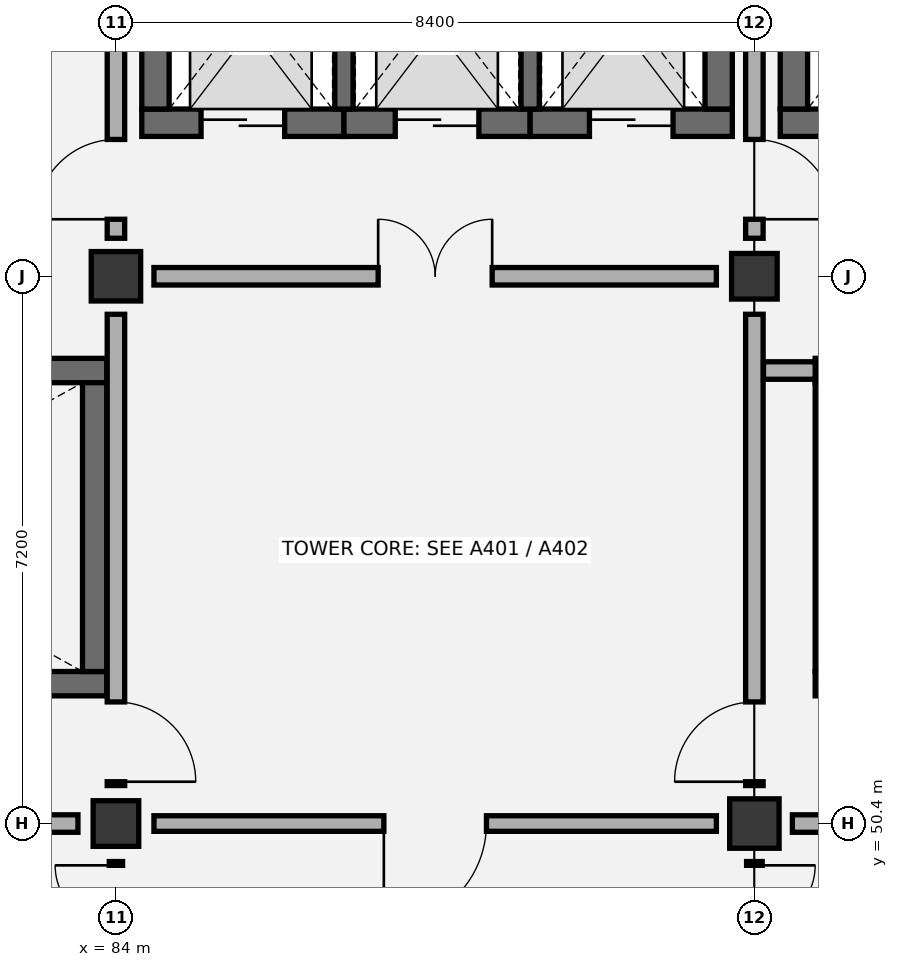
"""IFC4 building model, lengths in metres.
Left out: names, types, materials, properties, quantities, classifications, styles, units other than length and angle.
Written with IfcOpenShell. Run it as: python <this file> out.ifc"""

import sys

from ifc_helpers import new_model, si_unit, direction, frame, frame_2d, origin, origin_2d, place, context, subcontext, project, spatial, rectangle, extrude, element, fill, save


model = new_model("IFC4")
c1 = context("Model", 3, precision=1e-05, world=origin(), true_north=direction((0.0, 1.0)))
c2 = subcontext(c1, "Body", "Model", "MODEL_VIEW")
j1 = project(units=[si_unit("LENGTHUNIT", "METRE"), si_unit("PLANEANGLEUNIT", "RADIAN")], contexts=[c1])
p1 = place(None, origin())
s1 = spatial("IfcSite", under=j1, at=p1, CompositionType="ELEMENT")
p2 = place(p1, origin())
s2 = spatial("IfcBuilding", under=s1, at=p2, CompositionType="ELEMENT")
p3 = place(p2, frame((0.0, 0.0, 56.4)))
s3 = spatial("IfcBuildingStorey", under=s2, at=p3, CompositionType="ELEMENT", Elevation=56.4)
p4 = place(p3, frame((84.0, 50.4, 0.0), z_axis=(0.0, 0.0, 1.0), x_axis=(1.0, 0.0, 0.0)))
e1 = element("IfcColumn", 1, at=p4, inside=s3, PredefinedType="COLUMN", context=c2, shape_type="SweptSolid", body=[
    extrude(rectangle(XDim=0.6, YDim=0.6, at=origin_2d()), origin(), (0.0, 0.0, 1.0), 4.2),
])
for number, where, z_axis, x_axis in (
    (2, (84.0, 57.6, 0.0), (0.0, 0.0, 1.0), (1.0, 0.0, 0.0)),
    (3, (92.4, 50.4, 0.0), (0.0, 0.0, 1.0), (1.0, 0.0, 0.0)),
):
    element("IfcColumn", number, at=place(p3, frame(where, z_axis=z_axis, x_axis=x_axis)), inside=s3, PredefinedType="COLUMN", context=c2, shape_type="SweptSolid", body=[
        extrude(rectangle(XDim=0.65, YDim=0.65, at=origin_2d()), origin(), (0.0, 0.0, 1.0), 4.2),
    ])
p5 = place(p3, frame((92.4, 57.6, 0.0), z_axis=(0.0, 0.0, 1.0), x_axis=(1.0, 0.0, 0.0)))
e4 = element("IfcColumn", 4, at=p5, inside=s3, PredefinedType="COLUMN", context=c2, shape_type="SweptSolid", body=[
    extrude(rectangle(XDim=0.6, YDim=0.6, at=origin_2d()), origin(), (0.0, 0.0, 1.0), 4.2),
])
p6 = place(p3, frame((76.4, 52.24, 0.0), z_axis=(0.0, 0.0, 1.0), x_axis=(1.0, 0.0, 0.0)))
e5 = element("IfcWall", 5, at=p6, inside=s3, PredefinedType="SHEAR", context=c2, shape_type="SweptSolid", body=[
    extrude(rectangle(XDim=7.48, YDim=0.32, at=frame_2d((3.74, 0.0))), origin(), (0.0, 0.0, 1.0), 3.92),
])
p7 = place(p6, frame((0.45, 0.0, 0.0)))
e6 = element("IfcOpeningElement", 6, at=p7, cuts=e5, PredefinedType="OPENING", context=c2, shape_type="SweptSolid", body=[
    extrude(rectangle(XDim=1.05, YDim=2.15, at=frame_2d((0.525, 1.075))), frame((0.0, 0.17, 0.0), z_axis=(0.0, -1.0, 0.0), x_axis=(1.0, 0.0, 0.0)), (0.0, 0.0, 1.0), 0.34),
])
p8 = place(p3, frame((76.4, 56.36, 0.0), z_axis=(0.0, 0.0, 1.0), x_axis=(1.0, 0.0, 0.0)))
e7 = element("IfcWall", 7, at=p8, inside=s3, PredefinedType="SHEAR", context=c2, shape_type="SweptSolid", body=[
    extrude(rectangle(XDim=7.48, YDim=0.32, at=frame_2d((3.74, 0.0))), origin(), (0.0, 0.0, 1.0), 3.92),
])
p9 = place(p3, frame((83.72, 52.4, 0.0), z_axis=(0.0, 0.0, 1.0), x_axis=(0.0, 1.0, 0.0)))
e8 = element("IfcWall", 8, at=p9, inside=s3, PredefinedType="SHEAR", context=c2, shape_type="SweptSolid", body=[
    extrude(rectangle(XDim=3.8, YDim=0.32, at=frame_2d((1.9, 0.0))), origin(), (0.0, 0.0, 1.0), 3.92),
])
p10 = place(p3, frame((93.2, 52.24, 0.0), z_axis=(0.0, 0.0, 1.0), x_axis=(1.0, 0.0, 0.0)))
e9 = element("IfcWall", 9, at=p10, inside=s3, PredefinedType="SHEAR", context=c2, shape_type="SweptSolid", body=[
    extrude(rectangle(XDim=7.48, YDim=0.32, at=frame_2d((3.74, 0.0))), origin(), (0.0, 0.0, 1.0), 3.92),
])
p11 = place(p10, frame((0.45, 0.0, 0.0)))
e10 = element("IfcOpeningElement", 10, at=p11, cuts=e9, PredefinedType="OPENING", context=c2, shape_type="SweptSolid", body=[
    extrude(rectangle(XDim=1.05, YDim=2.15, at=frame_2d((0.525, 1.075))), frame((0.0, 0.17, 0.0), z_axis=(0.0, -1.0, 0.0), x_axis=(1.0, 0.0, 0.0)), (0.0, 0.0, 1.0), 0.34),
])
p12 = place(p3, frame((93.2, 56.36, 0.0), z_axis=(0.0, 0.0, 1.0), x_axis=(1.0, 0.0, 0.0)))
e11 = element("IfcWall", 11, at=p12, inside=s3, PredefinedType="SHEAR", context=c2, shape_type="SweptSolid", body=[
    extrude(rectangle(XDim=7.48, YDim=0.32, at=frame_2d((3.74, 0.0))), origin(), (0.0, 0.0, 1.0), 3.92),
])
p13 = place(p3, frame((93.36, 52.4, 0.0), z_axis=(0.0, 0.0, 1.0), x_axis=(0.0, 1.0, 0.0)))
e12 = element("IfcWall", 12, at=p13, inside=s3, PredefinedType="SHEAR", context=c2, shape_type="SweptSolid", body=[
    extrude(rectangle(XDim=3.8, YDim=0.32, at=frame_2d((1.9, 0.0))), origin(), (0.0, 0.0, 1.0), 3.92),
])
p14 = place(p3, frame((84.34, 59.62, 0.0), z_axis=(0.0, 0.0, 1.0), x_axis=(1.0, 0.0, 0.0)))
e13 = element("IfcWall", 13, at=p14, inside=s3, PredefinedType="SHEAR", context=c2, shape_type="SweptSolid", body=[
    extrude(rectangle(XDim=2.66, YDim=0.36, at=frame_2d((1.33, 0.0))), origin(), (0.0, 0.0, 1.0), 3.92),
])
p15 = place(p14, frame((0.78, 0.0, 0.0)))
e14 = element("IfcOpeningElement", 14, at=p15, cuts=e13, PredefinedType="OPENING", context=c2, shape_type="SweptSolid", body=[
    extrude(rectangle(XDim=1.1, YDim=2.15, at=frame_2d((0.55, 1.075))), frame((0.0, 0.19, 0.0), z_axis=(0.0, -1.0, 0.0), x_axis=(1.0, 0.0, 0.0)), (0.0, 0.0, 1.0), 0.38),
])
p16 = place(p3, frame((87.0, 59.62, 0.0), z_axis=(0.0, 0.0, 1.0), x_axis=(1.0, 0.0, 0.0)))
e15 = element("IfcWall", 15, at=p16, inside=s3, PredefinedType="SHEAR", context=c2, shape_type="SweptSolid", body=[
    extrude(rectangle(XDim=2.45, YDim=0.36, at=frame_2d((1.225, 0.0))), origin(), (0.0, 0.0, 1.0), 3.92),
])
p17 = place(p16, frame((0.675, 0.0, 0.0)))
e16 = element("IfcOpeningElement", 16, at=p17, cuts=e15, PredefinedType="OPENING", context=c2, shape_type="SweptSolid", body=[
    extrude(rectangle(XDim=1.1, YDim=2.15, at=frame_2d((0.55, 1.075))), frame((0.0, 0.19, 0.0), z_axis=(0.0, -1.0, 0.0), x_axis=(1.0, 0.0, 0.0)), (0.0, 0.0, 1.0), 0.38),
])
p18 = place(p3, frame((89.45, 59.62, 0.0), z_axis=(0.0, 0.0, 1.0), x_axis=(1.0, 0.0, 0.0)))
e17 = element("IfcWall", 17, at=p18, inside=s3, PredefinedType="SHEAR", context=c2, shape_type="SweptSolid", body=[
    extrude(rectangle(XDim=2.66, YDim=0.36, at=frame_2d((1.33, 0.0))), origin(), (0.0, 0.0, 1.0), 3.92),
])
p19 = place(p18, frame((0.78, 0.0, 0.0)))
e18 = element("IfcOpeningElement", 18, at=p19, cuts=e17, PredefinedType="OPENING", context=c2, shape_type="SweptSolid", body=[
    extrude(rectangle(XDim=1.1, YDim=2.15, at=frame_2d((0.55, 1.075))), frame((0.0, 0.19, 0.0), z_axis=(0.0, -1.0, 0.0), x_axis=(1.0, 0.0, 0.0)), (0.0, 0.0, 1.0), 0.38),
])
for number, where, z_axis, x_axis in (
    (19, (84.52, 59.8, 0.0), (0.0, 0.0, 1.0), (0.0, 1.0, 0.0)),
    (20, (91.93, 59.8, 0.0), (0.0, 0.0, 1.0), (0.0, 1.0, 0.0)),
):
    element("IfcWall", number, at=place(p3, frame(where, z_axis=z_axis, x_axis=x_axis)), inside=s3, PredefinedType="SHEAR", context=c2, shape_type="SweptSolid", body=[
        extrude(rectangle(XDim=2.8, YDim=0.36, at=frame_2d((1.4, 0.0))), origin(), (0.0, 0.0, 1.0), 3.92),
    ])
for number, where, z_axis, x_axis in (
    (21, (87.0, 59.8, 0.0), (0.0, 0.0, 1.0), (0.0, 1.0, 0.0)),
    (22, (89.45, 59.8, 0.0), (0.0, 0.0, 1.0), (0.0, 1.0, 0.0)),
):
    element("IfcWall", number, at=place(p3, frame(where, z_axis=z_axis, x_axis=x_axis)), inside=s3, PredefinedType="SHEAR", context=c2, shape_type="SweptSolid", body=[
        extrude(rectangle(XDim=2.8, YDim=0.24, at=frame_2d((1.4, 0.0))), origin(), (0.0, 0.0, 1.0), 3.92),
    ])
p20 = place(p3, frame((92.74, 59.62, 0.0), z_axis=(0.0, 0.0, 1.0), x_axis=(1.0, 0.0, 0.0)))
e23 = element("IfcWall", 23, at=p20, inside=s3, PredefinedType="SHEAR", context=c2, shape_type="SweptSolid", body=[
    extrude(rectangle(XDim=2.87, YDim=0.36, at=frame_2d((1.435, 0.0))), origin(), (0.0, 0.0, 1.0), 3.92),
])
p21 = place(p20, frame((0.76, 0.0, 0.0)))
e24 = element("IfcOpeningElement", 24, at=p21, cuts=e23, PredefinedType="OPENING", context=c2, shape_type="SweptSolid", body=[
    extrude(rectangle(XDim=1.35, YDim=2.2, at=frame_2d((0.675, 1.1))), frame((0.0, 0.19, 0.0), z_axis=(0.0, -1.0, 0.0), x_axis=(1.0, 0.0, 0.0)), (0.0, 0.0, 1.0), 0.38),
])
p22 = place(p3, frame((92.92, 59.8, 0.0), z_axis=(0.0, 0.0, 1.0), x_axis=(0.0, 1.0, 0.0)))
e25 = element("IfcWall", 25, at=p22, inside=s3, PredefinedType="SHEAR", context=c2, shape_type="SweptSolid", body=[
    extrude(rectangle(XDim=2.8, YDim=0.36, at=frame_2d((1.4, 0.0))), origin(), (0.0, 0.0, 1.0), 3.92),
])
p23 = place(p3, frame((84.0, 43.7, 0.0), z_axis=(0.0, 0.0, 1.0), x_axis=(0.0, 1.0, 0.0)))
e26 = element("IfcWall", 26, at=p23, inside=s3, PredefinedType="PARTITIONING", context=c2, shape_type="SweptSolid", body=[
    extrude(rectangle(XDim=6.2, YDim=0.175, at=frame_2d((3.1, 0.0))), origin(), (0.0, 0.0, 1.0), 3.415),
])
p24 = place(p23, frame((4.55, 0.0, 0.0)))
e27 = element("IfcOpeningElement", 27, at=p24, cuts=e26, PredefinedType="OPENING", context=c2, shape_type="SweptSolid", body=[
    extrude(rectangle(XDim=1.6, YDim=2.2, at=frame_2d((0.8, 1.1))), frame((0.0, 0.097, 0.0), z_axis=(0.0, -1.0, 0.0), x_axis=(1.0, 0.0, 0.0)), (0.0, 0.0, 1.0), 0.195),
])
p25 = place(p3, frame((76.1, 50.4, 0.0), z_axis=(0.0, 0.0, 1.0), x_axis=(1.0, 0.0, 0.0)))
e28 = element("IfcWall", 28, at=p25, inside=s3, PredefinedType="PARTITIONING", context=c2, shape_type="SweptSolid", body=[
    extrude(rectangle(XDim=7.4, YDim=0.23, at=frame_2d((3.7, 0.0))), origin(), (0.0, 0.0, 1.0), 3.415),
])
p26 = place(p25, frame((2.95, 0.0, 0.0)))
e29 = element("IfcOpeningElement", 29, at=p26, cuts=e28, PredefinedType="OPENING", context=c2, shape_type="SweptSolid", body=[
    extrude(rectangle(XDim=1.5, YDim=2.15, at=frame_2d((0.75, 1.075))), frame((0.0, 0.125, 0.0), z_axis=(0.0, -1.0, 0.0), x_axis=(1.0, 0.0, 0.0)), (0.0, 0.0, 1.0), 0.25),
])
p27 = place(p3, frame((84.0, 50.9, 0.0), z_axis=(0.0, 0.0, 1.0), x_axis=(0.0, 1.0, 0.0)))
e30 = element("IfcWall", 30, at=p27, inside=s3, PredefinedType="PARTITIONING", context=c2, shape_type="SweptSolid", body=[
    extrude(rectangle(XDim=6.2, YDim=0.23, at=frame_2d((3.1, 0.0))), origin(), (0.0, 0.0, 1.0), 3.415),
])
p28 = place(p27, frame((0.05, 0.0, 0.0)))
e31 = element("IfcOpeningElement", 31, at=p28, cuts=e30, PredefinedType="OPENING", context=c2, shape_type="SweptSolid", body=[
    extrude(rectangle(XDim=1.05, YDim=2.15, at=frame_2d((0.525, 1.075))), frame((0.0, 0.125, 0.0), z_axis=(0.0, -1.0, 0.0), x_axis=(1.0, 0.0, 0.0)), (0.0, 0.0, 1.0), 0.25),
])
p29 = place(p3, frame((84.0, 58.1, 0.0), z_axis=(0.0, 0.0, 1.0), x_axis=(0.0, 1.0, 0.0)))
e32 = element("IfcWall", 32, at=p29, inside=s3, PredefinedType="PARTITIONING", context=c2, shape_type="SweptSolid", body=[
    extrude(rectangle(XDim=6.2, YDim=0.23, at=frame_2d((3.1, 0.0))), origin(), (0.0, 0.0, 1.0), 3.515),
])
p30 = place(p29, frame((0.25, 0.0, 0.0)))
e33 = element("IfcOpeningElement", 33, at=p30, cuts=e32, PredefinedType="OPENING", context=c2, shape_type="SweptSolid", body=[
    extrude(rectangle(XDim=1.05, YDim=2.15, at=frame_2d((0.525, 1.075))), frame((0.0, 0.125, 0.0), z_axis=(0.0, -1.0, 0.0), x_axis=(1.0, 0.0, 0.0)), (0.0, 0.0, 1.0), 0.25),
])
p31 = place(p3, frame((92.4, 43.7, 0.0), z_axis=(0.0, 0.0, 1.0), x_axis=(0.0, 1.0, 0.0)))
e34 = element("IfcWall", 34, at=p31, inside=s3, PredefinedType="PARTITIONING", context=c2, shape_type="SweptSolid", body=[
    extrude(rectangle(XDim=6.2, YDim=0.205, at=frame_2d((3.1, 0.0))), origin(), (0.0, 0.0, 1.0), 3.415),
])
p32 = place(p31, frame((4.55, 0.0, 0.0)))
e35 = element("IfcOpeningElement", 35, at=p32, cuts=e34, PredefinedType="OPENING", context=c2, shape_type="SweptSolid", body=[
    extrude(rectangle(XDim=1.6, YDim=2.2, at=frame_2d((0.8, 1.1))), frame((0.0, 0.113, 0.0), z_axis=(0.0, -1.0, 0.0), x_axis=(1.0, 0.0, 0.0)), (0.0, 0.0, 1.0), 0.225),
])
p33 = place(p3, frame((84.5, 50.4, 0.0), z_axis=(0.0, 0.0, 1.0), x_axis=(1.0, 0.0, 0.0)))
e36 = element("IfcWall", 36, at=p33, inside=s3, PredefinedType="PARTITIONING", context=c2, shape_type="SweptSolid", body=[
    extrude(rectangle(XDim=7.4, YDim=0.205, at=frame_2d((3.7, 0.0))), origin(), (0.0, 0.0, 1.0), 3.415),
])
p34 = place(p33, frame((3.025, 0.0, 0.0)))
e37 = element("IfcOpeningElement", 37, at=p34, cuts=e36, PredefinedType="OPENING", context=c2, shape_type="SweptSolid", body=[
    extrude(rectangle(XDim=1.35, YDim=2.15, at=frame_2d((0.675, 1.075))), frame((0.0, 0.113, 0.0), z_axis=(0.0, -1.0, 0.0), x_axis=(1.0, 0.0, 0.0)), (0.0, 0.0, 1.0), 0.225),
])
p35 = place(p3, frame((92.4, 50.9, 0.0), z_axis=(0.0, 0.0, 1.0), x_axis=(0.0, 1.0, 0.0)))
e38 = element("IfcWall", 38, at=p35, inside=s3, PredefinedType="PARTITIONING", context=c2, shape_type="SweptSolid", body=[
    extrude(rectangle(XDim=6.2, YDim=0.23, at=frame_2d((3.1, 0.0))), origin(), (0.0, 0.0, 1.0), 3.515),
])
p36 = place(p35, frame((0.05, 0.0, 0.0)))
e39 = element("IfcOpeningElement", 39, at=p36, cuts=e38, PredefinedType="OPENING", context=c2, shape_type="SweptSolid", body=[
    extrude(rectangle(XDim=1.05, YDim=2.15, at=frame_2d((0.525, 1.075))), frame((0.0, 0.125, 0.0), z_axis=(0.0, -1.0, 0.0), x_axis=(1.0, 0.0, 0.0)), (0.0, 0.0, 1.0), 0.25),
])
p37 = place(p3, frame((84.5, 57.6, 0.0), z_axis=(0.0, 0.0, 1.0), x_axis=(1.0, 0.0, 0.0)))
e40 = element("IfcWall", 40, at=p37, inside=s3, PredefinedType="PARTITIONING", context=c2, shape_type="SweptSolid", body=[
    extrude(rectangle(XDim=7.4, YDim=0.23, at=frame_2d((3.7, 0.0))), origin(), (0.0, 0.0, 1.0), 3.415),
])
p38 = place(p37, frame((2.95, 0.0, 0.0)))
e41 = element("IfcOpeningElement", 41, at=p38, cuts=e40, PredefinedType="OPENING", context=c2, shape_type="SweptSolid", body=[
    extrude(rectangle(XDim=1.5, YDim=2.15, at=frame_2d((0.75, 1.075))), frame((0.0, 0.125, 0.0), z_axis=(0.0, -1.0, 0.0), x_axis=(1.0, 0.0, 0.0)), (0.0, 0.0, 1.0), 0.25),
])
p39 = place(p3, frame((92.4, 58.1, 0.0), z_axis=(0.0, 0.0, 1.0), x_axis=(0.0, 1.0, 0.0)))
e42 = element("IfcWall", 42, at=p39, inside=s3, PredefinedType="PARTITIONING", context=c2, shape_type="SweptSolid", body=[
    extrude(rectangle(XDim=6.2, YDim=0.23, at=frame_2d((3.1, 0.0))), origin(), (0.0, 0.0, 1.0), 3.415),
])
p40 = place(p39, frame((0.25, 0.0, 0.0)))
e43 = element("IfcOpeningElement", 43, at=p40, cuts=e42, PredefinedType="OPENING", context=c2, shape_type="SweptSolid", body=[
    extrude(rectangle(XDim=1.05, YDim=2.15, at=frame_2d((0.525, 1.075))), frame((0.0, 0.125, 0.0), z_axis=(0.0, -1.0, 0.0), x_axis=(1.0, 0.0, 0.0)), (0.0, 0.0, 1.0), 0.25),
])
p41 = place(p3, frame((92.9, 50.4, 0.0), z_axis=(0.0, 0.0, 1.0), x_axis=(1.0, 0.0, 0.0)))
e44 = element("IfcWall", 44, at=p41, inside=s3, PredefinedType="PARTITIONING", context=c2, shape_type="SweptSolid", body=[
    extrude(rectangle(XDim=7.4, YDim=0.23, at=frame_2d((3.7, 0.0))), origin(), (0.0, 0.0, 1.0), 3.415),
])
p42 = place(p41, frame((2.95, 0.0, 0.0)))
e45 = element("IfcOpeningElement", 45, at=p42, cuts=e44, PredefinedType="OPENING", context=c2, shape_type="SweptSolid", body=[
    extrude(rectangle(XDim=1.5, YDim=2.15, at=frame_2d((0.75, 1.075))), frame((0.0, 0.125, 0.0), z_axis=(0.0, -1.0, 0.0), x_axis=(1.0, 0.0, 0.0)), (0.0, 0.0, 1.0), 0.25),
])
p43 = place(p3, frame((92.52, 56.36, 0.0), z_axis=(0.0, 0.0, 1.0), x_axis=(1.0, 0.0, 0.0)))
e46 = element("IfcWall", 46, at=p43, inside=s3, PredefinedType="PARTITIONING", context=c2, shape_type="SweptSolid", body=[
    extrude(rectangle(XDim=0.68, YDim=0.23, at=frame_2d((0.34, 0.0))), origin(), (0.0, 0.0, 1.0), 3.92),
])
p44 = place(p15, origin())
e47 = element("IfcDoor", 47, at=p44, inside=s3, OperationType="DOUBLE_DOOR_SLIDING", PredefinedType="DOOR", context=c2, shape_type="SweptSolid", body=[
    extrude(rectangle(XDim=1.1, YDim=2.15, at=frame_2d((0.55, 1.075))), frame((0.0, 0.025, 0.0), z_axis=(0.0, -1.0, 0.0), x_axis=(1.0, 0.0, 0.0)), (0.0, 0.0, 1.0), 0.05),
])
fill(e14, e47)
p45 = place(p17, origin())
e48 = element("IfcDoor", 48, at=p45, inside=s3, OperationType="DOUBLE_DOOR_SLIDING", PredefinedType="DOOR", context=c2, shape_type="SweptSolid", body=[
    extrude(rectangle(XDim=1.1, YDim=2.15, at=frame_2d((0.55, 1.075))), frame((0.0, 0.025, 0.0), z_axis=(0.0, -1.0, 0.0), x_axis=(1.0, 0.0, 0.0)), (0.0, 0.0, 1.0), 0.05),
])
fill(e16, e48)
p46 = place(p19, origin())
e49 = element("IfcDoor", 49, at=p46, inside=s3, OperationType="DOUBLE_DOOR_SLIDING", PredefinedType="DOOR", context=c2, shape_type="SweptSolid", body=[
    extrude(rectangle(XDim=1.1, YDim=2.15, at=frame_2d((0.55, 1.075))), frame((0.0, 0.025, 0.0), z_axis=(0.0, -1.0, 0.0), x_axis=(1.0, 0.0, 0.0)), (0.0, 0.0, 1.0), 0.05),
])
fill(e18, e49)
p47 = place(p24, origin())
e50 = element("IfcDoor", 50, at=p47, inside=s3, OperationType="DOUBLE_DOOR_SINGLE_SWING", PredefinedType="DOOR", context=c2, shape_type="SweptSolid", body=[
    extrude(rectangle(XDim=1.6, YDim=2.2, at=frame_2d((0.8, 1.1))), frame((0.0, 0.025, 0.0), z_axis=(0.0, -1.0, 0.0), x_axis=(1.0, 0.0, 0.0)), (0.0, 0.0, 1.0), 0.05),
])
fill(e27, e50)
p48 = place(p28, frame((1.05, 0.0, 0.0), z_axis=(0.0, 0.0, 1.0), x_axis=(-1.0, 0.0, 0.0)))
e51 = element("IfcDoor", 51, at=p48, inside=s3, OperationType="SINGLE_SWING_RIGHT", PredefinedType="DOOR", context=c2, shape_type="SweptSolid", body=[
    extrude(rectangle(XDim=1.05, YDim=2.15, at=frame_2d((0.525, 1.075))), frame((0.0, 0.025, 0.0), z_axis=(0.0, -1.0, 0.0), x_axis=(1.0, 0.0, 0.0)), (0.0, 0.0, 1.0), 0.05),
])
fill(e31, e51)
p49 = place(p30, origin())
e52 = element("IfcDoor", 52, at=p49, inside=s3, OperationType="SINGLE_SWING_LEFT", PredefinedType="DOOR", context=c2, shape_type="SweptSolid", body=[
    extrude(rectangle(XDim=1.05, YDim=2.15, at=frame_2d((0.525, 1.075))), frame((0.0, 0.025, 0.0), z_axis=(0.0, -1.0, 0.0), x_axis=(1.0, 0.0, 0.0)), (0.0, 0.0, 1.0), 0.05),
])
fill(e33, e52)
p50 = place(p32, frame((1.6, 0.0, 0.0), z_axis=(0.0, 0.0, 1.0), x_axis=(-1.0, 0.0, 0.0)))
e53 = element("IfcDoor", 53, at=p50, inside=s3, OperationType="DOUBLE_DOOR_SINGLE_SWING", PredefinedType="DOOR", context=c2, shape_type="SweptSolid", body=[
    extrude(rectangle(XDim=1.6, YDim=2.2, at=frame_2d((0.8, 1.1))), frame((0.0, 0.025, 0.0), z_axis=(0.0, -1.0, 0.0), x_axis=(1.0, 0.0, 0.0)), (0.0, 0.0, 1.0), 0.05),
])
fill(e35, e53)
p51 = place(p34, frame((1.35, 0.0, 0.0), z_axis=(0.0, 0.0, 1.0), x_axis=(-1.0, 0.0, 0.0)))
e54 = element("IfcDoor", 54, at=p51, inside=s3, OperationType="SINGLE_SWING_RIGHT", PredefinedType="DOOR", context=c2, shape_type="SweptSolid", body=[
    extrude(rectangle(XDim=1.35, YDim=2.15, at=frame_2d((0.675, 1.075))), frame((0.0, 0.025, 0.0), z_axis=(0.0, -1.0, 0.0), x_axis=(1.0, 0.0, 0.0)), (0.0, 0.0, 1.0), 0.05),
])
fill(e37, e54)
p52 = place(p36, origin())
e55 = element("IfcDoor", 55, at=p52, inside=s3, OperationType="SINGLE_SWING_LEFT", PredefinedType="DOOR", context=c2, shape_type="SweptSolid", body=[
    extrude(rectangle(XDim=1.05, YDim=2.15, at=frame_2d((0.525, 1.075))), frame((0.0, 0.025, 0.0), z_axis=(0.0, -1.0, 0.0), x_axis=(1.0, 0.0, 0.0)), (0.0, 0.0, 1.0), 0.05),
])
fill(e39, e55)
p53 = place(p38, origin())
e56 = element("IfcDoor", 56, at=p53, inside=s3, OperationType="DOUBLE_DOOR_SINGLE_SWING", PredefinedType="DOOR", context=c2, shape_type="SweptSolid", body=[
    extrude(rectangle(XDim=1.5, YDim=2.15, at=frame_2d((0.75, 1.075))), frame((0.0, 0.025, 0.0), z_axis=(0.0, -1.0, 0.0), x_axis=(1.0, 0.0, 0.0)), (0.0, 0.0, 1.0), 0.05),
])
fill(e41, e56)
p54 = place(p40, frame((1.05, 0.0, 0.0), z_axis=(0.0, 0.0, 1.0), x_axis=(-1.0, 0.0, 0.0)))
e57 = element("IfcDoor", 57, at=p54, inside=s3, OperationType="SINGLE_SWING_RIGHT", PredefinedType="DOOR", context=c2, shape_type="SweptSolid", body=[
    extrude(rectangle(XDim=1.05, YDim=2.15, at=frame_2d((0.525, 1.075))), frame((0.0, 0.025, 0.0), z_axis=(0.0, -1.0, 0.0), x_axis=(1.0, 0.0, 0.0)), (0.0, 0.0, 1.0), 0.05),
])
fill(e43, e57)
save(model, sys.argv[1])
